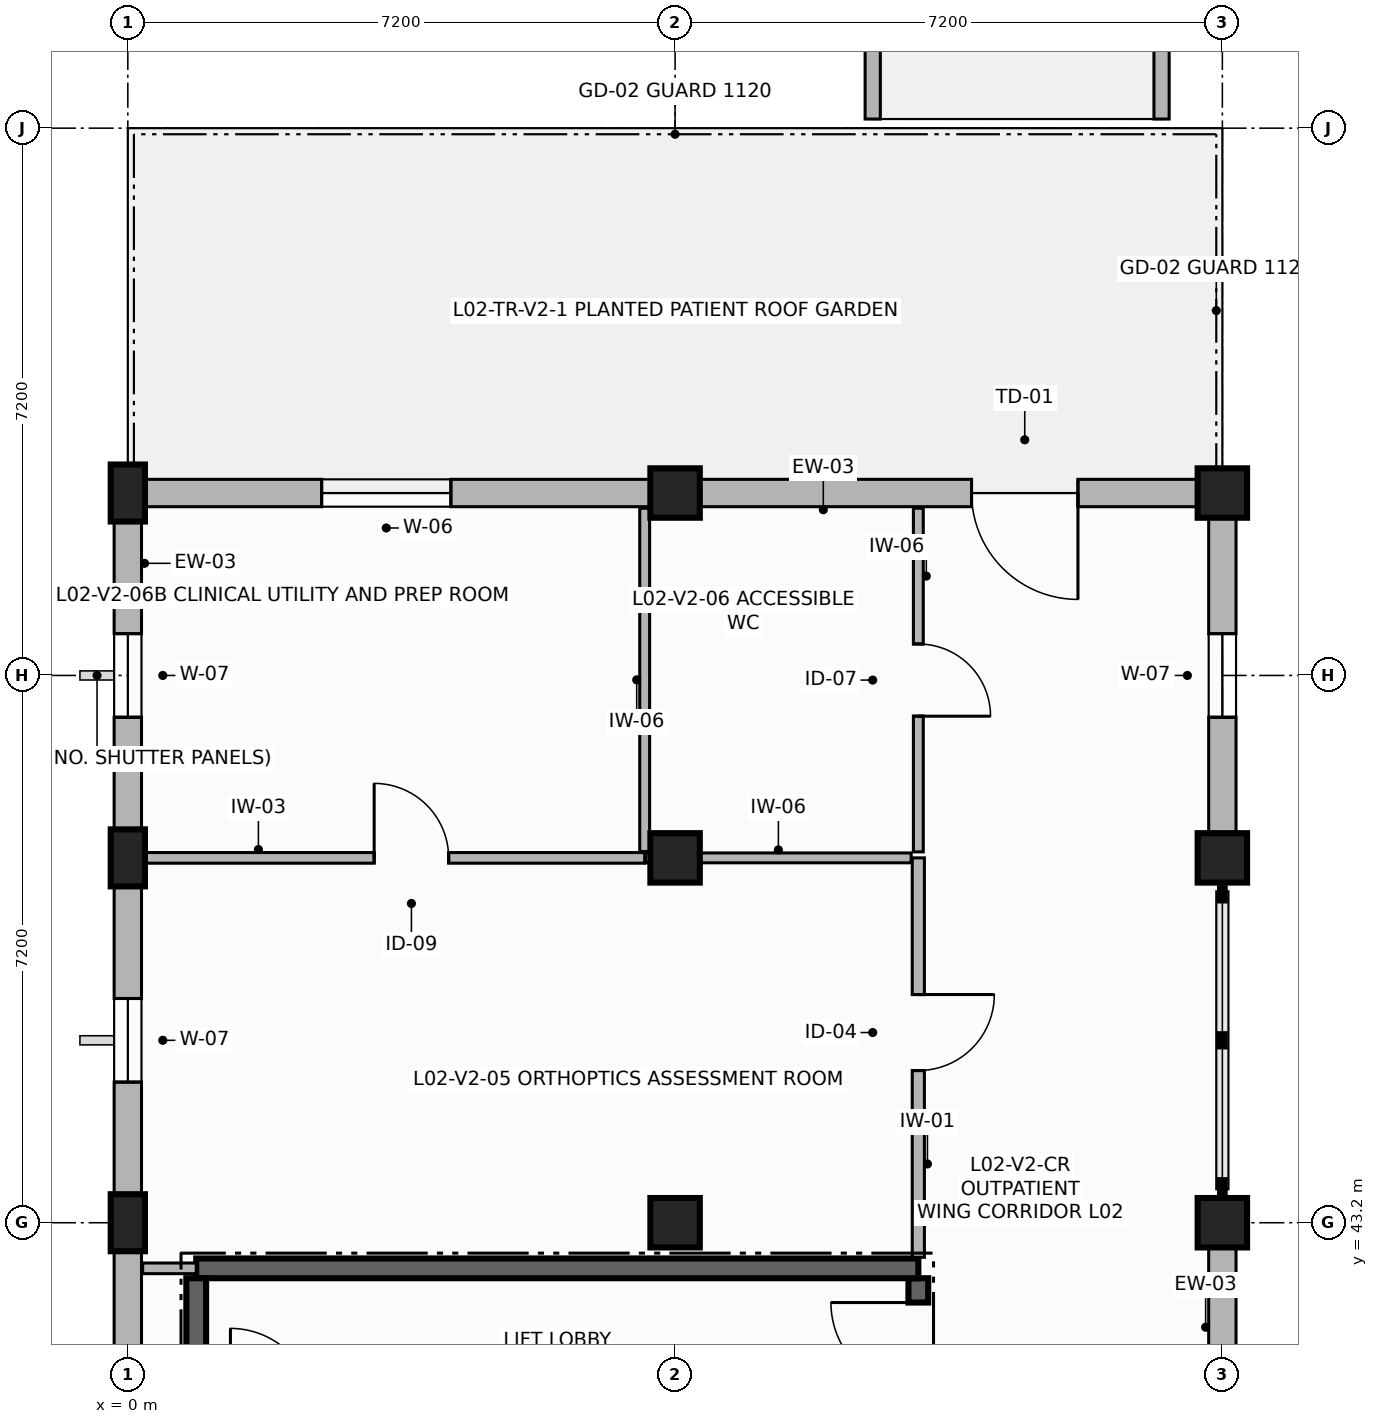
"""IFC4 building model, lengths in metres.
Left out: names, types, materials, properties, quantities, classifications, styles, units other than length and angle.
Written with IfcOpenShell. Run it as: python <this file> out.ifc"""

import sys

from ifc_helpers import new_model, si_unit, direction, frame, frame_2d, origin, origin_2d, place, context, subcontext, project, spatial, rectangle, extrude, element, fill, save


model = new_model("IFC4")
c1 = context("Model", 3, precision=1e-05, world=origin(), true_north=direction((0.0, 1.0)))
c2 = subcontext(c1, "Body", "Model", "MODEL_VIEW")
j1 = project(units=[si_unit("LENGTHUNIT", "METRE"), si_unit("PLANEANGLEUNIT", "RADIAN")], contexts=[c1])
p1 = place(None, origin())
s1 = spatial("IfcSite", under=j1, at=p1, CompositionType="ELEMENT")
p2 = place(p1, origin())
s2 = spatial("IfcBuilding", under=s1, at=p2, CompositionType="ELEMENT")
p3 = place(p2, frame((0.0, 0.0, 8.4)))
s3 = spatial("IfcBuildingStorey", under=s2, at=p3, CompositionType="ELEMENT", Elevation=8.4)
for number, where, z_axis, x_axis in (
    (1, (0.0, 43.2, 0.0), (0.0, 0.0, 1.0), (1.0, 0.0, 0.0)),
    (2, (0.0, 48.0, 0.0), (0.0, 0.0, 1.0), (1.0, 0.0, 0.0)),
    (3, (0.0, 52.8, 0.0), (0.0, 0.0, 1.0), (1.0, 0.0, 0.0)),
):
    element("IfcColumn", number, at=place(p3, frame(where, z_axis=z_axis, x_axis=x_axis)), inside=s3, PredefinedType="PILASTER", context=c2, shape_type="SweptSolid", body=[
        extrude(rectangle(XDim=0.45, YDim=0.75, at=origin_2d()), origin(), (0.0, 0.0, 1.0), 3.62),
    ])
for number, where, z_axis, x_axis in (
    (4, (7.2, 43.2, 0.0), (0.0, 0.0, 1.0), (1.0, 0.0, 0.0)),
    (5, (7.2, 48.0, 0.0), (0.0, 0.0, 1.0), (1.0, 0.0, 0.0)),
    (6, (7.2, 52.8, 0.0), (0.0, 0.0, 1.0), (1.0, 0.0, 0.0)),
    (7, (14.4, 43.2, 0.0), (0.0, 0.0, 1.0), (1.0, 0.0, 0.0)),
    (8, (14.4, 48.0, 0.0), (0.0, 0.0, 1.0), (1.0, 0.0, 0.0)),
    (9, (14.4, 52.8, 0.0), (0.0, 0.0, 1.0), (1.0, 0.0, 0.0)),
):
    element("IfcColumn", number, at=place(p3, frame(where, z_axis=z_axis, x_axis=x_axis)), inside=s3, PredefinedType="COLUMN", context=c2, shape_type="SweptSolid", body=[
        extrude(rectangle(XDim=0.65, YDim=0.65, at=origin_2d()), origin(), (0.0, 0.0, 1.0), 3.62),
    ])
for number, where, z_axis, x_axis in (
    (10, (13.6, 57.72, 0.4), (0.0, 0.0, 1.0), (0.0, 1.0, 0.0)),
    (11, (9.8, 79.08, 0.4), (0.0, 0.0, 1.0), (0.0, -1.0, 0.0)),
):
    element("IfcWall", number, at=place(p3, frame(where, z_axis=z_axis, x_axis=x_axis)), inside=s3, PredefinedType="PARAPET", context=c2, shape_type="SweptSolid", body=[
        extrude(rectangle(XDim=21.36, YDim=0.2, at=frame_2d((10.68, 0.0))), origin(), (0.0, 0.0, 1.0), 0.95),
    ])
p4 = place(p3, frame((14.4, 36.0, 0.0), z_axis=(0.0, 0.0, 1.0), x_axis=(0.0, 1.0, 0.0)))
e12 = element("IfcWall", 12, at=p4, inside=s3, PredefinedType="SOLIDWALL", context=c2, shape_type="SweptSolid", body=[
    extrude(rectangle(XDim=7.2, YDim=0.36, at=frame_2d((3.6, 0.0))), origin(), (0.0, 0.0, 1.0), 3.0),
])
p5 = place(p4, frame((2.75, 0.0, 0.85)))
e13 = element("IfcOpeningElement", 13, at=p5, cuts=e12, PredefinedType="OPENING", context=c2, shape_type="SweptSolid", body=[
    extrude(rectangle(XDim=1.7, YDim=1.9, at=frame_2d((0.85, 0.95))), frame((0.0, 0.19, 0.0), z_axis=(0.0, -1.0, 0.0), x_axis=(1.0, 0.0, 0.0)), (0.0, 0.0, 1.0), 0.38),
])
p6 = place(p3, frame((14.4, 48.0, 0.0), z_axis=(0.0, 0.0, 1.0), x_axis=(0.0, 1.0, 0.0)))
e14 = element("IfcWall", 14, at=p6, inside=s3, PredefinedType="SOLIDWALL", context=c2, shape_type="SweptSolid", body=[
    extrude(rectangle(XDim=4.8, YDim=0.36, at=frame_2d((2.4, 0.0))), origin(), (0.0, 0.0, 1.0), 3.0),
])
p7 = place(p6, frame((1.85, 0.0, 0.85)))
e15 = element("IfcOpeningElement", 15, at=p7, cuts=e14, PredefinedType="OPENING", context=c2, shape_type="SweptSolid", body=[
    extrude(rectangle(XDim=1.1, YDim=1.85, at=frame_2d((0.55, 0.925))), frame((0.0, 0.19, 0.0), z_axis=(0.0, -1.0, 0.0), x_axis=(1.0, 0.0, 0.0)), (0.0, 0.0, 1.0), 0.38),
])
p8 = place(p3, frame((14.4, 52.8, 0.0), z_axis=(0.0, 0.0, 1.0), x_axis=(-1.0, 0.0, 0.0)))
e16 = element("IfcWall", 16, at=p8, inside=s3, PredefinedType="SOLIDWALL", context=c2, shape_type="SweptSolid", body=[
    extrude(rectangle(XDim=7.2, YDim=0.36, at=frame_2d((3.6, 0.0))), origin(), (0.0, 0.0, 1.0), 3.0),
])
p9 = place(p8, frame((1.9, 0.0, 0.0)))
e17 = element("IfcOpeningElement", 17, at=p9, cuts=e16, PredefinedType="OPENING", context=c2, shape_type="SweptSolid", body=[
    extrude(rectangle(XDim=1.4, YDim=2.25, at=frame_2d((0.7, 1.125))), frame((0.0, 0.19, 0.0), z_axis=(0.0, -1.0, 0.0), x_axis=(1.0, 0.0, 0.0)), (0.0, 0.0, 1.0), 0.38),
])
p10 = place(p3, frame((7.2, 52.8, 0.0), z_axis=(0.0, 0.0, 1.0), x_axis=(-1.0, 0.0, 0.0)))
e18 = element("IfcWall", 18, at=p10, inside=s3, PredefinedType="SOLIDWALL", context=c2, shape_type="SweptSolid", body=[
    extrude(rectangle(XDim=7.2, YDim=0.36, at=frame_2d((3.6, 0.0))), origin(), (0.0, 0.0, 1.0), 3.0),
])
p11 = place(p10, frame((2.95, 0.0, 0.85)))
e19 = element("IfcOpeningElement", 19, at=p11, cuts=e18, PredefinedType="OPENING", context=c2, shape_type="SweptSolid", body=[
    extrude(rectangle(XDim=1.7, YDim=1.9, at=frame_2d((0.85, 0.95))), frame((0.0, 0.19, 0.0), z_axis=(0.0, -1.0, 0.0), x_axis=(1.0, 0.0, 0.0)), (0.0, 0.0, 1.0), 0.38),
])
p12 = place(p3, frame((0.0, 52.8, 0.0), z_axis=(0.0, 0.0, 1.0), x_axis=(0.0, -1.0, 0.0)))
e20 = element("IfcWall", 20, at=p12, inside=s3, PredefinedType="SOLIDWALL", context=c2, shape_type="SweptSolid", body=[
    extrude(rectangle(XDim=4.8, YDim=0.36, at=frame_2d((2.4, 0.0))), origin(), (0.0, 0.0, 1.0), 3.0),
])
p13 = place(p12, frame((1.85, 0.0, 0.85)))
e21 = element("IfcOpeningElement", 21, at=p13, cuts=e20, PredefinedType="OPENING", context=c2, shape_type="SweptSolid", body=[
    extrude(rectangle(XDim=1.1, YDim=1.85, at=frame_2d((0.55, 0.925))), frame((0.0, 0.19, 0.0), z_axis=(0.0, -1.0, 0.0), x_axis=(1.0, 0.0, 0.0)), (0.0, 0.0, 1.0), 0.38),
])
p14 = place(p3, frame((0.0, 48.0, 0.0), z_axis=(0.0, 0.0, 1.0), x_axis=(0.0, -1.0, 0.0)))
e22 = element("IfcWall", 22, at=p14, inside=s3, PredefinedType="SOLIDWALL", context=c2, shape_type="SweptSolid", body=[
    extrude(rectangle(XDim=4.8, YDim=0.36, at=frame_2d((2.4, 0.0))), origin(), (0.0, 0.0, 1.0), 3.0),
])
p15 = place(p14, frame((1.85, 0.0, 0.85)))
e23 = element("IfcOpeningElement", 23, at=p15, cuts=e22, PredefinedType="OPENING", context=c2, shape_type="SweptSolid", body=[
    extrude(rectangle(XDim=1.1, YDim=1.85, at=frame_2d((0.55, 0.925))), frame((0.0, 0.19, 0.0), z_axis=(0.0, -1.0, 0.0), x_axis=(1.0, 0.0, 0.0)), (0.0, 0.0, 1.0), 0.38),
])
p16 = place(p3, frame((0.0, 43.2, 0.0), z_axis=(0.0, 0.0, 1.0), x_axis=(0.0, -1.0, 0.0)))
e24 = element("IfcWall", 24, at=p16, inside=s3, PredefinedType="SOLIDWALL", context=c2, shape_type="SweptSolid", body=[
    extrude(rectangle(XDim=7.2, YDim=0.36, at=frame_2d((3.6, 0.0))), origin(), (0.0, 0.0, 1.0), 3.0),
])
p17 = place(p16, frame((2.75, 0.0, 0.85)))
e25 = element("IfcOpeningElement", 25, at=p17, cuts=e24, PredefinedType="OPENING", context=c2, shape_type="SweptSolid", body=[
    extrude(rectangle(XDim=1.5, YDim=1.9, at=frame_2d((0.75, 0.95))), frame((0.0, 0.19, 0.0), z_axis=(0.0, -1.0, 0.0), x_axis=(1.0, 0.0, 0.0)), (0.0, 0.0, 1.0), 0.38),
])
p18 = place(p3, frame((10.4, 36.93, 0.0), z_axis=(0.0, 0.0, 1.0), x_axis=(0.0, 1.0, 0.0)))
e26 = element("IfcWall", 26, at=p18, inside=s3, PredefinedType="SHEAR", context=c2, shape_type="SweptSolid", body=[
    extrude(rectangle(XDim=5.54, YDim=0.26, at=frame_2d((2.77, 0.0))), origin(), (0.0, 0.0, 1.0), 3.62),
])
p19 = place(p18, frame((4.07, 0.0, 0.0)))
e27 = element("IfcOpeningElement", 27, at=p19, cuts=e26, PredefinedType="OPENING", context=c2, shape_type="SweptSolid", body=[
    extrude(rectangle(XDim=1.15, YDim=2.2, at=frame_2d((0.575, 1.1))), frame((0.0, 0.14, 0.0), z_axis=(0.0, -1.0, 0.0), x_axis=(1.0, 0.0, 0.0)), (0.0, 0.0, 1.0), 0.28),
])
p20 = place(p3, frame((10.4, 42.6, 0.0), z_axis=(0.0, 0.0, 1.0), x_axis=(-1.0, 0.0, 0.0)))
e28 = element("IfcWall", 28, at=p20, inside=s3, PredefinedType="SHEAR", context=c2, shape_type="SweptSolid", body=[
    extrude(rectangle(XDim=9.5, YDim=0.26, at=frame_2d((4.75, 0.0))), origin(), (0.0, 0.0, 1.0), 3.62),
])
p21 = place(p3, frame((0.9, 42.47, 0.0), z_axis=(0.0, 0.0, 1.0), x_axis=(0.0, -1.0, 0.0)))
e29 = element("IfcWall", 29, at=p21, inside=s3, PredefinedType="SHEAR", context=c2, shape_type="SweptSolid", body=[
    extrude(rectangle(XDim=5.54, YDim=0.26, at=frame_2d((2.77, 0.0))), origin(), (0.0, 0.0, 1.0), 3.62),
])
p22 = place(p3, frame((10.4, 48.0, 0.0), z_axis=(0.0, 0.0, 1.0), x_axis=(0.0, -1.0, 0.0)))
e30 = element("IfcWall", 30, at=p22, inside=s3, PredefinedType="PARTITIONING", context=c2, shape_type="SweptSolid", body=[
    extrude(rectangle(XDim=5.255, YDim=0.16, at=frame_2d((2.627, 0.0))), origin(), (0.0, 0.0, 1.0), 2.98),
])
p23 = place(p22, frame((1.798, 0.0, 0.0)))
e31 = element("IfcOpeningElement", 31, at=p23, cuts=e30, PredefinedType="OPENING", context=c2, shape_type="SweptSolid", body=[
    extrude(rectangle(XDim=1.0, YDim=2.15, at=frame_2d((0.5, 1.075))), frame((0.0, 0.09, 0.0), z_axis=(0.0, -1.0, 0.0), x_axis=(1.0, 0.0, 0.0)), (0.0, 0.0, 1.0), 0.18),
])
p24 = place(p3, frame((0.9, 42.6, 0.0), z_axis=(0.0, 0.0, 1.0), x_axis=(-1.0, 0.0, 0.0)))
e32 = element("IfcWall", 32, at=p24, inside=s3, PredefinedType="PARTITIONING", context=c2, shape_type="SweptSolid", body=[
    extrude(rectangle(XDim=0.705, YDim=0.14, at=frame_2d((0.353, 0.0))), origin(), (0.0, 0.0, 1.0), 2.98),
])
p25 = place(p3, frame((0.195, 48.0, 0.0), z_axis=(0.0, 0.0, 1.0), x_axis=(1.0, 0.0, 0.0)))
e33 = element("IfcWall", 33, at=p25, inside=s3, PredefinedType="PARTITIONING", context=c2, shape_type="SweptSolid", body=[
    extrude(rectangle(XDim=6.605, YDim=0.14, at=frame_2d((3.302, 0.0))), origin(), (0.0, 0.0, 1.0), 2.98),
])
p26 = place(p25, frame((3.046, 0.0, 0.0)))
e34 = element("IfcOpeningElement", 34, at=p26, cuts=e33, PredefinedType="OPENING", context=c2, shape_type="SweptSolid", body=[
    extrude(rectangle(XDim=0.98, YDim=2.15, at=frame_2d((0.49, 1.075))), frame((0.0, 0.08, 0.0), z_axis=(0.0, -1.0, 0.0), x_axis=(1.0, 0.0, 0.0)), (0.0, 0.0, 1.0), 0.16),
])
p27 = place(p3, frame((6.812, 48.0, 0.0), z_axis=(0.0, 0.0, 1.0), x_axis=(1.0, 0.0, 0.0)))
e35 = element("IfcWall", 35, at=p27, inside=s3, PredefinedType="PARTITIONING", context=c2, shape_type="SweptSolid", body=[
    extrude(rectangle(XDim=3.494, YDim=0.13, at=frame_2d((1.747, 0.0))), origin(), (0.0, 0.0, 1.0), 2.98),
])
p28 = place(p3, frame((6.8, 48.084, 0.0), z_axis=(0.0, 0.0, 1.0), x_axis=(0.0, 1.0, 0.0)))
e36 = element("IfcWall", 36, at=p28, inside=s3, PredefinedType="PARTITIONING", context=c2, shape_type="SweptSolid", body=[
    extrude(rectangle(XDim=4.516, YDim=0.13, at=frame_2d((2.258, 0.0))), origin(), (0.0, 0.0, 1.0), 2.98),
])
p29 = place(p3, frame((10.4, 52.6, 0.0), z_axis=(0.0, 0.0, 1.0), x_axis=(0.0, -1.0, 0.0)))
e37 = element("IfcWall", 37, at=p29, inside=s3, PredefinedType="PARTITIONING", context=c2, shape_type="SweptSolid", body=[
    extrude(rectangle(XDim=4.521, YDim=0.13, at=frame_2d((2.26, 0.0))), origin(), (0.0, 0.0, 1.0), 2.98),
])
p30 = place(p29, frame((1.786, 0.0, 0.0)))
e38 = element("IfcOpeningElement", 38, at=p30, cuts=e37, PredefinedType="OPENING", context=c2, shape_type="SweptSolid", body=[
    extrude(rectangle(XDim=0.95, YDim=2.1, at=frame_2d((0.475, 1.05))), frame((0.0, 0.075, 0.0), z_axis=(0.0, -1.0, 0.0), x_axis=(1.0, 0.0, 0.0)), (0.0, 0.0, 1.0), 0.15),
])
p31 = place(p7, origin())
e39 = element("IfcWindow", 39, at=p31, inside=s3, PartitioningType="SINGLE_PANEL", PredefinedType="WINDOW", context=c2, shape_type="SweptSolid", body=[
    extrude(rectangle(XDim=1.1, YDim=1.85, at=frame_2d((0.55, 0.925))), frame((0.0, 0.03, 0.0), z_axis=(0.0, -1.0, 0.0), x_axis=(1.0, 0.0, 0.0)), (0.0, 0.0, 1.0), 0.06),
])
fill(e15, e39)
p32 = place(p9, origin())
e40 = element("IfcDoor", 40, at=p32, inside=s3, OperationType="SINGLE_SWING_LEFT", PredefinedType="DOOR", context=c2, shape_type="SweptSolid", body=[
    extrude(rectangle(XDim=1.4, YDim=2.25, at=frame_2d((0.7, 1.125))), frame((0.0, 0.025, 0.0), z_axis=(0.0, -1.0, 0.0), x_axis=(1.0, 0.0, 0.0)), (0.0, 0.0, 1.0), 0.05),
])
fill(e17, e40)
p33 = place(p11, origin())
e41 = element("IfcWindow", 41, at=p33, inside=s3, PartitioningType="SINGLE_PANEL", PredefinedType="WINDOW", context=c2, shape_type="SweptSolid", body=[
    extrude(rectangle(XDim=1.7, YDim=1.9, at=frame_2d((0.85, 0.95))), frame((0.0, 0.03, 0.0), z_axis=(0.0, -1.0, 0.0), x_axis=(1.0, 0.0, 0.0)), (0.0, 0.0, 1.0), 0.06),
])
fill(e19, e41)
p34 = place(p13, origin())
e42 = element("IfcWindow", 42, at=p34, inside=s3, PartitioningType="SINGLE_PANEL", PredefinedType="WINDOW", context=c2, shape_type="SweptSolid", body=[
    extrude(rectangle(XDim=1.1, YDim=1.85, at=frame_2d((0.55, 0.925))), frame((0.0, 0.03, 0.0), z_axis=(0.0, -1.0, 0.0), x_axis=(1.0, 0.0, 0.0)), (0.0, 0.0, 1.0), 0.06),
])
fill(e21, e42)
p35 = place(p15, origin())
e43 = element("IfcWindow", 43, at=p35, inside=s3, PartitioningType="SINGLE_PANEL", PredefinedType="WINDOW", context=c2, shape_type="SweptSolid", body=[
    extrude(rectangle(XDim=1.1, YDim=1.85, at=frame_2d((0.55, 0.925))), frame((0.0, 0.03, 0.0), z_axis=(0.0, -1.0, 0.0), x_axis=(1.0, 0.0, 0.0)), (0.0, 0.0, 1.0), 0.06),
])
fill(e23, e43)
p36 = place(p19, origin())
e44 = element("IfcDoor", 44, at=p36, inside=s3, OperationType="SINGLE_SWING_RIGHT", PredefinedType="DOOR", context=c2, shape_type="SweptSolid", body=[
    extrude(rectangle(XDim=1.15, YDim=2.2, at=frame_2d((0.575, 1.1))), frame((0.0, 0.025, 0.0), z_axis=(0.0, -1.0, 0.0), x_axis=(1.0, 0.0, 0.0)), (0.0, 0.0, 1.0), 0.05),
])
fill(e27, e44)
p37 = place(p23, origin())
e45 = element("IfcDoor", 45, at=p37, inside=s3, OperationType="SINGLE_SWING_LEFT", PredefinedType="DOOR", context=c2, shape_type="SweptSolid", body=[
    extrude(rectangle(XDim=1.0, YDim=2.15, at=frame_2d((0.5, 1.075))), frame((0.0, 0.025, 0.0), z_axis=(0.0, -1.0, 0.0), x_axis=(1.0, 0.0, 0.0)), (0.0, 0.0, 1.0), 0.05),
])
fill(e31, e45)
p38 = place(p30, origin())
e46 = element("IfcDoor", 46, at=p38, inside=s3, OperationType="SINGLE_SWING_RIGHT", PredefinedType="DOOR", context=c2, shape_type="SweptSolid", body=[
    extrude(rectangle(XDim=0.95, YDim=2.1, at=frame_2d((0.475, 1.05))), frame((0.0, 0.025, 0.0), z_axis=(0.0, -1.0, 0.0), x_axis=(1.0, 0.0, 0.0)), (0.0, 0.0, 1.0), 0.05),
])
fill(e38, e46)
p39 = place(p26, origin())
e47 = element("IfcDoor", 47, at=p39, inside=s3, OperationType="SINGLE_SWING_LEFT", PredefinedType="DOOR", context=c2, shape_type="SweptSolid", body=[
    extrude(rectangle(XDim=0.98, YDim=2.15, at=frame_2d((0.49, 1.075))), frame((0.0, 0.025, 0.0), z_axis=(0.0, -1.0, 0.0), x_axis=(1.0, 0.0, 0.0)), (0.0, 0.0, 1.0), 0.05),
])
fill(e34, e47)
save(model, sys.argv[1])
